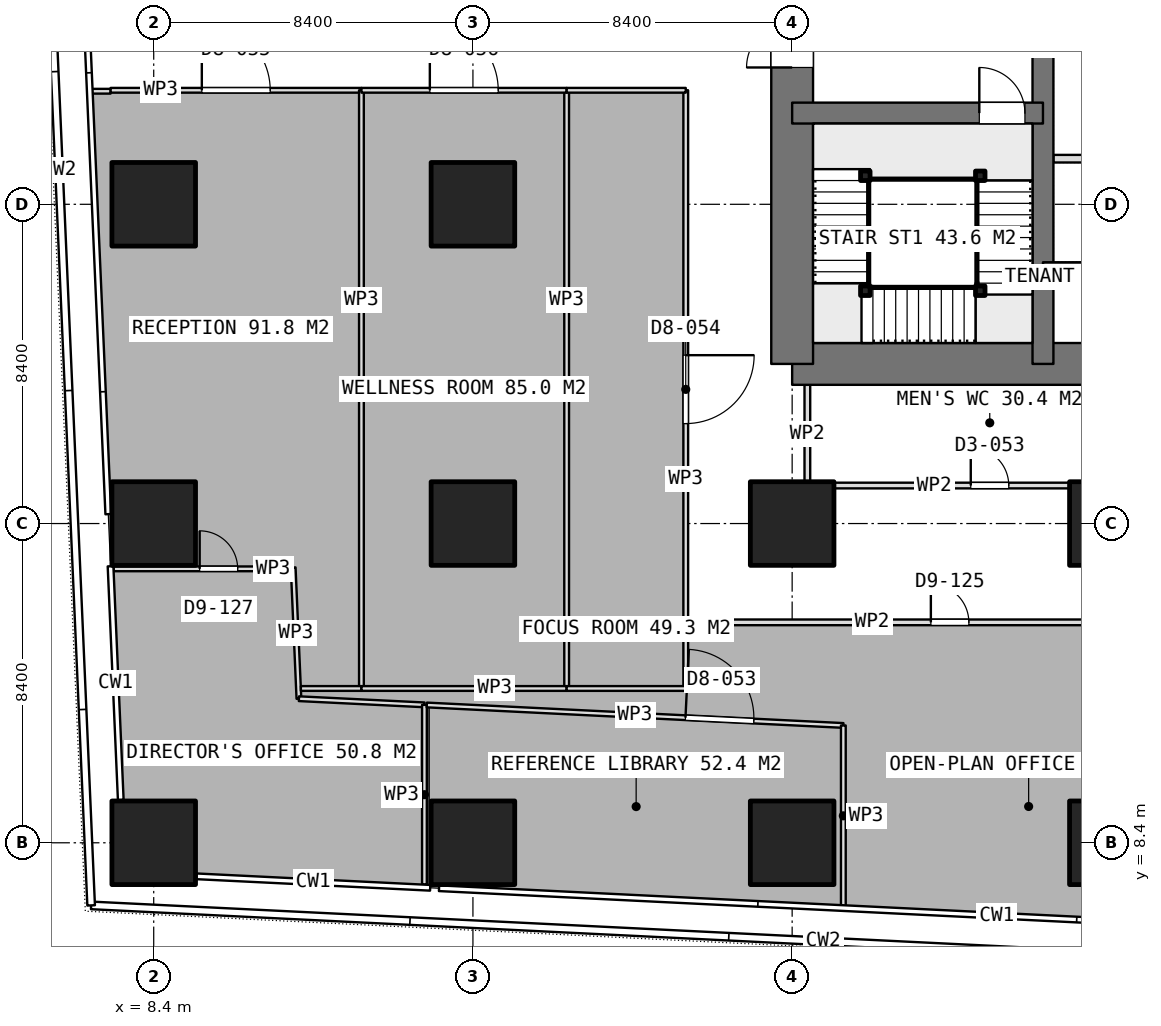
"""IFC4 building model, lengths in metres.
Left out: names, types, materials, properties, quantities, classifications, styles, units other than length and angle.
Written with IfcOpenShell. Run it as: python <this file> out.ifc"""

import sys

from ifc_helpers import new_model, si_unit, direction, frame, frame_2d, origin, origin_2d, place, context, subcontext, project, spatial, rectangle, extrude, element, fill, save


model = new_model("IFC4")
c1 = context("Model", 3, precision=1e-05, world=origin(), true_north=direction((0.0, 1.0)))
c2 = subcontext(c1, "Body", "Model", "MODEL_VIEW")
j1 = project(units=[si_unit("LENGTHUNIT", "METRE"), si_unit("PLANEANGLEUNIT", "RADIAN")], contexts=[c1])
p1 = place(None, origin())
s1 = spatial("IfcSite", under=j1, at=p1, CompositionType="ELEMENT")
p2 = place(p1, origin())
s2 = spatial("IfcBuilding", under=s1, at=p2, CompositionType="ELEMENT")
p3 = place(p2, frame((0.0, 0.0, 47.9)))
s3 = spatial("IfcBuildingStorey", under=s2, at=p3, CompositionType="ELEMENT", Elevation=47.9)
p4 = place(p3, frame((25.2, 21.0, 0.0), z_axis=(0.0, 0.0, 1.0), x_axis=(1.0, 0.0, 0.0)))
e1 = element("IfcWall", 1, at=p4, inside=s3, PredefinedType="SHEAR", context=c2, shape_type="SweptSolid", body=[
    extrude(rectangle(XDim=10.4, YDim=1.1, at=frame_2d((5.2, 0.0))), origin(), (0.0, 0.0, 1.0), 3.75),
])
p5 = place(p3, frame((25.2, 21.0, 0.0), z_axis=(0.0, 0.0, 1.0), x_axis=(0.0, 1.0, 0.0)))
e2 = element("IfcWall", 2, at=p5, inside=s3, PredefinedType="SHEAR", context=c2, shape_type="SweptSolid", body=[
    extrude(rectangle(XDim=25.2, YDim=1.1, at=frame_2d((12.6, 0.0))), origin(), (0.0, 0.0, 1.0), 3.75),
])
p6 = place(p5, frame((7.8, 0.0, 0.0)))
e3 = element("IfcOpeningElement", 3, at=p6, cuts=e2, PredefinedType="OPENING", context=c2, shape_type="SweptSolid", body=[
    extrude(rectangle(XDim=1.2, YDim=2.1, at=frame_2d((0.6, 1.05))), frame((0.0, 0.56, 0.0), z_axis=(0.0, -1.0, 0.0), x_axis=(1.0, 0.0, 0.0)), (0.0, 0.0, 1.0), 1.12),
])
p7 = place(p5, frame((14.25, 0.0, 0.0)))
e4 = element("IfcOpeningElement", 4, at=p7, cuts=e2, PredefinedType="OPENING", context=c2, shape_type="SweptSolid", body=[
    extrude(rectangle(XDim=0.9, YDim=2.1, at=frame_2d((0.45, 1.05))), frame((0.0, 0.56, 0.0), z_axis=(0.0, -1.0, 0.0), x_axis=(1.0, 0.0, 0.0)), (0.0, 0.0, 1.0), 1.12),
])
p8 = place(p5, frame((16.85, 0.0, 0.0)))
e5 = element("IfcOpeningElement", 5, at=p8, cuts=e2, PredefinedType="OPENING", context=c2, shape_type="SweptSolid", body=[
    extrude(rectangle(XDim=0.9, YDim=2.1, at=frame_2d((0.45, 1.05))), frame((0.0, 0.56, 0.0), z_axis=(0.0, -1.0, 0.0), x_axis=(1.0, 0.0, 0.0)), (0.0, 0.0, 1.0), 1.12),
])
p9 = place(p5, frame((19.075, 0.0, 0.0)))
e6 = element("IfcOpeningElement", 6, at=p9, cuts=e2, PredefinedType="OPENING", context=c2, shape_type="SweptSolid", body=[
    extrude(rectangle(XDim=1.2, YDim=2.1, at=frame_2d((0.6, 1.05))), frame((0.0, 0.56, 0.0), z_axis=(0.0, -1.0, 0.0), x_axis=(1.0, 0.0, 0.0)), (0.0, 0.0, 1.0), 1.12),
])
p10 = place(p3, frame((31.8, 21.0, 0.0), z_axis=(0.0, 0.0, 1.0), x_axis=(0.0, 1.0, 0.0)))
e7 = element("IfcWall", 7, at=p10, inside=s3, PredefinedType="SHEAR", context=c2, shape_type="SweptSolid", body=[
    extrude(rectangle(XDim=25.2, YDim=0.55, at=frame_2d((12.6, 0.0))), origin(), (0.0, 0.0, 1.0), 3.75),
])
p11 = place(p3, frame((31.8, 23.4, 0.0), z_axis=(0.0, 0.0, 1.0), x_axis=(1.0, 0.0, 0.0)))
e8 = element("IfcWall", 8, at=p11, inside=s3, PredefinedType="SHEAR", context=c2, shape_type="SweptSolid", body=[
    extrude(rectangle(XDim=3.8, YDim=0.55, at=frame_2d((1.9, 0.0))), origin(), (0.0, 0.0, 1.0), 3.75),
])
p12 = place(p3, frame((25.2, 27.6, 0.0), z_axis=(0.0, 0.0, 1.0), x_axis=(1.0, 0.0, 0.0)))
e9 = element("IfcWall", 9, at=p12, inside=s3, PredefinedType="SHEAR", context=c2, shape_type="SweptSolid", body=[
    extrude(rectangle(XDim=6.6, YDim=0.55, at=frame_2d((3.3, 0.0))), origin(), (0.0, 0.0, 1.0), 3.75),
])
p13 = place(p12, frame((4.925, 0.0, 0.0)))
e10 = element("IfcOpeningElement", 10, at=p13, cuts=e9, PredefinedType="OPENING", context=c2, shape_type="SweptSolid", body=[
    extrude(rectangle(XDim=1.2, YDim=2.1, at=frame_2d((0.6, 1.05))), frame((0.0, 0.285, 0.0), z_axis=(0.0, -1.0, 0.0), x_axis=(1.0, 0.0, 0.0)), (0.0, 0.0, 1.0), 0.57),
])
for number, where, z_axis, x_axis in (
    (11, (8.4, 8.4, 0.0), (0.0, 0.0, 1.0), (1.0, 0.0, 0.0)),
    (12, (8.4, 16.8, 0.0), (0.0, 0.0, 1.0), (1.0, 0.0, 0.0)),
    (13, (8.4, 25.2, 0.0), (0.0, 0.0, 1.0), (1.0, 0.0, 0.0)),
    (14, (16.8, 8.4, 0.0), (0.0, 0.0, 1.0), (1.0, 0.0, 0.0)),
    (15, (16.8, 16.8, 0.0), (0.0, 0.0, 1.0), (1.0, 0.0, 0.0)),
    (16, (16.8, 25.2, 0.0), (0.0, 0.0, 1.0), (1.0, 0.0, 0.0)),
    (17, (25.2, 8.4, 0.0), (0.0, 0.0, 1.0), (1.0, 0.0, 0.0)),
    (18, (25.2, 16.8, 0.0), (0.0, 0.0, 1.0), (1.0, 0.0, 0.0)),
    (19, (33.6, 8.4, 0.0), (0.0, 0.0, 1.0), (1.0, 0.0, 0.0)),
    (20, (33.6, 16.8, 0.0), (0.0, 0.0, 1.0), (1.0, 0.0, 0.0)),
):
    element("IfcColumn", number, at=place(p3, frame(where, z_axis=z_axis, x_axis=x_axis)), inside=s3, PredefinedType="COLUMN", context=c2, shape_type="SweptSolid", body=[
        extrude(rectangle(XDim=2.2, YDim=2.2, at=origin_2d()), origin(), (0.0, 0.0, 1.0), 3.75),
    ])
p14 = place(p3, frame((32.075, 26.4, 0.0), z_axis=(0.0, 0.0, 1.0), x_axis=(1.0, 0.0, 0.0)))
e21 = element("IfcWall", 21, at=p14, inside=s3, PredefinedType="PARTITIONING", context=c2, shape_type="SweptSolid", body=[
    extrude(rectangle(XDim=3.25, YDim=0.2, at=frame_2d((1.625, 0.0))), origin(), (0.0, 0.0, 1.0), 3.5),
])
p15 = place(p3, frame((25.525, 17.8, 0.0), z_axis=(0.0, 0.0, 1.0), x_axis=(1.0, 0.0, 0.0)))
e22 = element("IfcWall", 22, at=p15, inside=s3, PredefinedType="PARTITIONING", context=c2, shape_type="SweptSolid", body=[
    extrude(rectangle(XDim=9.75, YDim=0.15, at=frame_2d((4.875, 0.0))), origin(), (0.0, 0.0, 1.0), 3.5),
])
p16 = place(p15, frame((4.375, 0.0, 0.0)))
e23 = element("IfcOpeningElement", 23, at=p16, cuts=e22, PredefinedType="OPENING", context=c2, shape_type="SweptSolid", body=[
    extrude(rectangle(XDim=1.0, YDim=2.1, at=frame_2d((0.5, 1.05))), frame((0.0, 0.085, 0.0), z_axis=(0.0, -1.0, 0.0), x_axis=(1.0, 0.0, 0.0)), (0.0, 0.0, 1.0), 0.17),
])
p17 = place(p3, frame((25.6, 17.875, 0.0), z_axis=(0.0, 0.0, 1.0), x_axis=(0.0, 1.0, 0.0)))
e24 = element("IfcWall", 24, at=p17, inside=s3, PredefinedType="PARTITIONING", context=c2, shape_type="SweptSolid", body=[
    extrude(rectangle(XDim=2.575, YDim=0.15, at=frame_2d((1.288, 0.0))), origin(), (0.0, 0.0, 1.0), 3.5),
])
p18 = place(p3, frame((7.347, 15.608, 0.0), z_axis=(0.0, 0.0, 1.0), x_axis=(1.0, 0.0, 0.0)))
e25 = element("IfcWall", 25, at=p18, inside=s3, PredefinedType="PARTITIONING", context=c2, shape_type="SweptSolid", body=[
    extrude(rectangle(XDim=4.662, YDim=0.125, at=frame_2d((2.331, 0.0))), origin(), (0.0, 0.0, 1.0), 3.5),
])
p19 = place(p18, frame((2.262, 0.0, 0.0)))
e26 = element("IfcOpeningElement", 26, at=p19, cuts=e25, PredefinedType="OPENING", context=c2, shape_type="SweptSolid", body=[
    extrude(rectangle(XDim=1.0, YDim=2.1, at=frame_2d((0.5, 1.05))), frame((0.0, 0.073, 0.0), z_axis=(0.0, -1.0, 0.0), x_axis=(1.0, 0.0, 0.0)), (0.0, 0.0, 1.0), 0.145),
])
p20 = place(p3, frame((12.07, 15.643, 0.0), z_axis=(0.0, 0.0, 1.0), x_axis=(0.043664115519, -0.999046267705, 0.0)))
e27 = element("IfcWall", 27, at=p20, inside=s3, PredefinedType="PARTITIONING", context=c2, shape_type="SweptSolid", body=[
    extrude(rectangle(XDim=3.455, YDim=0.125, at=frame_2d((1.728, 0.0))), origin(), (0.0, 0.0, 1.0), 3.5),
])
p21 = place(p3, frame((12.221, 12.191, 0.0), z_axis=(0.0, 0.0, 1.0), x_axis=(0.998801372368, -0.048947099555, 0.0)))
e28 = element("IfcWall", 28, at=p21, inside=s3, PredefinedType="PARTITIONING", context=c2, shape_type="SweptSolid", body=[
    extrude(rectangle(XDim=3.307, YDim=0.125, at=frame_2d((1.653, 0.0))), origin(), (0.0, 0.0, 1.0), 3.5),
])
p22 = place(p3, frame((15.524, 12.029, 0.0), z_axis=(0.0, 0.0, 1.0), x_axis=(0.0, -1.0, 0.0)))
e29 = element("IfcWall", 29, at=p22, inside=s3, PredefinedType="PARTITIONING", context=c2, shape_type="SweptSolid", body=[
    extrude(rectangle(XDim=4.726, YDim=0.125, at=frame_2d((2.363, 0.0))), origin(), (0.0, 0.0, 1.0), 3.5),
])
p23 = place(p3, frame((15.586, 12.026, 0.0), z_axis=(0.0, 0.0, 1.0), x_axis=(0.998793981911, -0.04909767508, 0.0)))
e30 = element("IfcWall", 30, at=p23, inside=s3, PredefinedType="PARTITIONING", context=c2, shape_type="SweptSolid", body=[
    extrude(rectangle(XDim=10.974, YDim=0.125, at=frame_2d((5.487, 0.0))), origin(), (0.0, 0.0, 1.0), 3.5),
])
p24 = place(p23, frame((6.815, 0.0, 0.0)))
e31 = element("IfcOpeningElement", 31, at=p24, cuts=e30, PredefinedType="OPENING", context=c2, shape_type="SweptSolid", body=[
    extrude(rectangle(XDim=1.8, YDim=2.1, at=frame_2d((0.9, 1.05))), frame((0.0, 0.073, 0.0), z_axis=(0.0, -1.0, 0.0), x_axis=(1.0, 0.0, 0.0)), (0.0, 0.0, 1.0), 0.145),
])
p25 = place(p3, frame((26.547, 11.487, 0.0), z_axis=(0.0, 0.0, 1.0), x_axis=(0.0, -1.0, 0.0)))
e32 = element("IfcWall", 32, at=p25, inside=s3, PredefinedType="PARTITIONING", context=c2, shape_type="SweptSolid", body=[
    extrude(rectangle(XDim=4.755, YDim=0.125, at=frame_2d((2.377, 0.0))), origin(), (0.0, 0.0, 1.0), 3.5),
])
p26 = place(p3, frame((6.768, 28.175, 0.0), z_axis=(0.0, 0.0, 1.0), x_axis=(1.0, 0.0, 0.0)))
e33 = element("IfcWall", 33, at=p26, inside=s3, PredefinedType="PARTITIONING", context=c2, shape_type="SweptSolid", body=[
    extrude(rectangle(XDim=0.498, YDim=0.125, at=frame_2d((0.249, 0.0))), origin(), (0.0, 0.0, 1.0), 3.5),
])
p27 = place(p3, frame((7.266, 28.2, 0.0), z_axis=(0.0, 0.0, 1.0), x_axis=(1.0, 0.0, 0.0)))
e34 = element("IfcWall", 34, at=p27, inside=s3, PredefinedType="PARTITIONING", context=c2, shape_type="SweptSolid", body=[
    extrude(rectangle(XDim=6.6, YDim=0.125, at=frame_2d((3.3, 0.0))), origin(), (0.0, 0.0, 1.0), 3.5),
])
p28 = place(p27, frame((2.4, 0.0, 0.0)))
e35 = element("IfcOpeningElement", 35, at=p28, cuts=e34, PredefinedType="OPENING", context=c2, shape_type="SweptSolid", body=[
    extrude(rectangle(XDim=1.8, YDim=2.1, at=frame_2d((0.9, 1.05))), frame((0.0, 0.073, 0.0), z_axis=(0.0, -1.0, 0.0), x_axis=(1.0, 0.0, 0.0)), (0.0, 0.0, 1.0), 0.145),
])
p29 = place(p3, frame((13.866, 28.2, 0.0), z_axis=(0.0, 0.0, 1.0), x_axis=(0.0, -1.0, 0.0)))
e36 = element("IfcWall", 36, at=p29, inside=s3, PredefinedType="PARTITIONING", context=c2, shape_type="SweptSolid", body=[
    extrude(rectangle(XDim=15.74, YDim=0.125, at=frame_2d((7.87, 0.0))), origin(), (0.0, 0.0, 1.0), 3.5),
])
p30 = place(p3, frame((13.866, 12.46, 0.0), z_axis=(0.0, 0.0, 1.0), x_axis=(-1.0, 0.0, 0.0)))
e37 = element("IfcWall", 37, at=p30, inside=s3, PredefinedType="PARTITIONING", context=c2, shape_type="SweptSolid", body=[
    extrude(rectangle(XDim=1.594, YDim=0.125, at=frame_2d((0.797, 0.0))), origin(), (0.0, 0.0, 1.0), 3.5),
])
p31 = place(p3, frame((19.266, 28.2, 0.0), z_axis=(0.0, 0.0, 1.0), x_axis=(0.0, -1.0, 0.0)))
e38 = element("IfcWall", 38, at=p31, inside=s3, PredefinedType="PARTITIONING", context=c2, shape_type="SweptSolid", body=[
    extrude(rectangle(XDim=15.74, YDim=0.125, at=frame_2d((7.87, 0.0))), origin(), (0.0, 0.0, 1.0), 3.5),
])
p32 = place(p3, frame((19.266, 12.46, 0.0), z_axis=(0.0, 0.0, 1.0), x_axis=(-1.0, 0.0, 0.0)))
e39 = element("IfcWall", 39, at=p32, inside=s3, PredefinedType="PARTITIONING", context=c2, shape_type="SweptSolid", body=[
    extrude(rectangle(XDim=5.4, YDim=0.125, at=frame_2d((2.7, 0.0))), origin(), (0.0, 0.0, 1.0), 3.5),
])
p33 = place(p3, frame((13.866, 28.2, 0.0), z_axis=(0.0, 0.0, 1.0), x_axis=(1.0, 0.0, 0.0)))
e40 = element("IfcWall", 40, at=p33, inside=s3, PredefinedType="PARTITIONING", context=c2, shape_type="SweptSolid", body=[
    extrude(rectangle(XDim=5.4, YDim=0.125, at=frame_2d((2.7, 0.0))), origin(), (0.0, 0.0, 1.0), 3.5),
])
p34 = place(p33, frame((1.8, 0.0, 0.0)))
e41 = element("IfcOpeningElement", 41, at=p34, cuts=e40, PredefinedType="OPENING", context=c2, shape_type="SweptSolid", body=[
    extrude(rectangle(XDim=1.8, YDim=2.1, at=frame_2d((0.9, 1.05))), frame((0.0, 0.073, 0.0), z_axis=(0.0, -1.0, 0.0), x_axis=(1.0, 0.0, 0.0)), (0.0, 0.0, 1.0), 0.145),
])
p35 = place(p3, frame((22.4, 28.2, 0.0), z_axis=(0.0, 0.0, 1.0), x_axis=(0.0, -1.0, 0.0)))
e42 = element("IfcWall", 42, at=p35, inside=s3, PredefinedType="PARTITIONING", context=c2, shape_type="SweptSolid", body=[
    extrude(rectangle(XDim=15.74, YDim=0.125, at=frame_2d((7.87, 0.0))), origin(), (0.0, 0.0, 1.0), 3.5),
])
p36 = place(p35, frame((6.97, 0.0, 0.0)))
e43 = element("IfcOpeningElement", 43, at=p36, cuts=e42, PredefinedType="OPENING", context=c2, shape_type="SweptSolid", body=[
    extrude(rectangle(XDim=1.8, YDim=2.1, at=frame_2d((0.9, 1.05))), frame((0.0, 0.073, 0.0), z_axis=(0.0, -1.0, 0.0), x_axis=(1.0, 0.0, 0.0)), (0.0, 0.0, 1.0), 0.145),
])
for number, where, z_axis, x_axis in (
    (44, (22.4, 12.46, 0.0), (0.0, 0.0, 1.0), (-1.0, 0.0, 0.0)),
    (45, (19.266, 28.2, 0.0), (0.0, 0.0, 1.0), (1.0, 0.0, 0.0)),
):
    element("IfcWall", number, at=place(p3, frame(where, z_axis=z_axis, x_axis=x_axis)), inside=s3, PredefinedType="PARTITIONING", context=c2, shape_type="SweptSolid", body=[
        extrude(rectangle(XDim=3.134, YDim=0.125, at=frame_2d((1.567, 0.0))), origin(), (0.0, 0.0, 1.0), 3.5),
    ])
p37 = place(p3, frame((22.462, 14.2, 0.0), z_axis=(0.0, 0.0, 1.0), x_axis=(1.0, 0.0, 0.0)))
e46 = element("IfcWall", 46, at=p37, inside=s3, PredefinedType="PARTITIONING", context=c2, shape_type="SweptSolid", body=[
    extrude(rectangle(XDim=13.837, YDim=0.15, at=frame_2d((6.918, 0.0))), origin(), (0.0, 0.0, 1.0), 3.5),
])
p38 = place(p37, frame((6.388, 0.0, 0.0)))
e47 = element("IfcOpeningElement", 47, at=p38, cuts=e46, PredefinedType="OPENING", context=c2, shape_type="SweptSolid", body=[
    extrude(rectangle(XDim=1.0, YDim=2.1, at=frame_2d((0.5, 1.05))), frame((0.0, 0.085, 0.0), z_axis=(0.0, -1.0, 0.0), x_axis=(1.0, 0.0, 0.0)), (0.0, 0.0, 1.0), 0.17),
])
for number, where, z_axis, x_axis in (
    (48, (30.15, 25.95, 0.0), (0.0, 0.0, 1.0), (1.0, 0.0, 0.0)),
    (49, (30.15, 22.925, 0.0), (0.0, 0.0, 1.0), (1.0, 0.0, 0.0)),
    (50, (27.125, 22.925, 0.0), (0.0, 0.0, 1.0), (1.0, 0.0, 0.0)),
    (51, (27.125, 25.95, 0.0), (0.0, 0.0, 1.0), (1.0, 0.0, 0.0)),
):
    element("IfcColumn", number, at=place(p3, frame(where, z_axis=z_axis, x_axis=x_axis)), inside=s3, PredefinedType="COLUMN", context=c2, shape_type="SweptSolid", body=[
        extrude(rectangle(XDim=0.25, YDim=0.25, at=origin_2d()), origin(), (0.0, 0.0, 1.0), 3.75),
    ])
p39 = place(p6, origin())
e52 = element("IfcDoor", 52, at=p39, inside=s3, OperationType="SINGLE_SWING_LEFT", PredefinedType="DOOR", context=c2, shape_type="SweptSolid", body=[
    extrude(rectangle(XDim=1.2, YDim=2.1, at=frame_2d((0.6, 1.05))), frame((0.0, 0.025, 0.0), z_axis=(0.0, -1.0, 0.0), x_axis=(1.0, 0.0, 0.0)), (0.0, 0.0, 1.0), 0.05),
])
fill(e3, e52)
p40 = place(p16, origin())
e53 = element("IfcDoor", 53, at=p40, inside=s3, OperationType="SINGLE_SWING_LEFT", PredefinedType="DOOR", context=c2, shape_type="SweptSolid", body=[
    extrude(rectangle(XDim=1.0, YDim=2.1, at=frame_2d((0.5, 1.05))), frame((0.0, 0.025, 0.0), z_axis=(0.0, -1.0, 0.0), x_axis=(1.0, 0.0, 0.0)), (0.0, 0.0, 1.0), 0.05),
])
fill(e23, e53)
p41 = place(p24, origin())
e54 = element("IfcDoor", 54, at=p41, inside=s3, OperationType="DOUBLE_DOOR_SINGLE_SWING", PredefinedType="DOOR", context=c2, shape_type="SweptSolid", body=[
    extrude(rectangle(XDim=1.8, YDim=2.1, at=frame_2d((0.9, 1.05))), frame((0.0, 0.025, 0.0), z_axis=(0.0, -1.0, 0.0), x_axis=(1.0, 0.0, 0.0)), (0.0, 0.0, 1.0), 0.05),
])
fill(e31, e54)
p42 = place(p28, origin())
e55 = element("IfcDoor", 55, at=p42, inside=s3, OperationType="DOUBLE_DOOR_SINGLE_SWING", PredefinedType="DOOR", context=c2, shape_type="SweptSolid", body=[
    extrude(rectangle(XDim=1.8, YDim=2.1, at=frame_2d((0.9, 1.05))), frame((0.0, 0.025, 0.0), z_axis=(0.0, -1.0, 0.0), x_axis=(1.0, 0.0, 0.0)), (0.0, 0.0, 1.0), 0.05),
])
fill(e35, e55)
p43 = place(p34, origin())
e56 = element("IfcDoor", 56, at=p43, inside=s3, OperationType="DOUBLE_DOOR_SINGLE_SWING", PredefinedType="DOOR", context=c2, shape_type="SweptSolid", body=[
    extrude(rectangle(XDim=1.8, YDim=2.1, at=frame_2d((0.9, 1.05))), frame((0.0, 0.025, 0.0), z_axis=(0.0, -1.0, 0.0), x_axis=(1.0, 0.0, 0.0)), (0.0, 0.0, 1.0), 0.05),
])
fill(e41, e56)
p44 = place(p36, origin())
e57 = element("IfcDoor", 57, at=p44, inside=s3, OperationType="DOUBLE_DOOR_SINGLE_SWING", PredefinedType="DOOR", context=c2, shape_type="SweptSolid", body=[
    extrude(rectangle(XDim=1.8, YDim=2.1, at=frame_2d((0.9, 1.05))), frame((0.0, 0.025, 0.0), z_axis=(0.0, -1.0, 0.0), x_axis=(1.0, 0.0, 0.0)), (0.0, 0.0, 1.0), 0.05),
])
fill(e43, e57)
p45 = place(p38, origin())
e58 = element("IfcDoor", 58, at=p45, inside=s3, OperationType="SINGLE_SWING_LEFT", PredefinedType="DOOR", context=c2, shape_type="SweptSolid", body=[
    extrude(rectangle(XDim=1.0, YDim=2.1, at=frame_2d((0.5, 1.05))), frame((0.0, 0.025, 0.0), z_axis=(0.0, -1.0, 0.0), x_axis=(1.0, 0.0, 0.0)), (0.0, 0.0, 1.0), 0.05),
])
fill(e47, e58)
p46 = place(p19, origin())
e59 = element("IfcDoor", 59, at=p46, inside=s3, OperationType="SINGLE_SWING_LEFT", PredefinedType="DOOR", context=c2, shape_type="SweptSolid", body=[
    extrude(rectangle(XDim=1.0, YDim=2.1, at=frame_2d((0.5, 1.05))), frame((0.0, 0.025, 0.0), z_axis=(0.0, -1.0, 0.0), x_axis=(1.0, 0.0, 0.0)), (0.0, 0.0, 1.0), 0.05),
])
fill(e26, e59)
p47 = place(p13, origin())
e60 = element("IfcDoor", 60, at=p47, inside=s3, OperationType="SINGLE_SWING_RIGHT", PredefinedType="DOOR", context=c2, shape_type="SweptSolid", body=[
    extrude(rectangle(XDim=1.2, YDim=2.1, at=frame_2d((0.6, 1.05))), frame((0.0, 0.025, 0.0), z_axis=(0.0, -1.0, 0.0), x_axis=(1.0, 0.0, 0.0)), (0.0, 0.0, 1.0), 0.05),
])
fill(e10, e60)
save(model, sys.argv[1])
